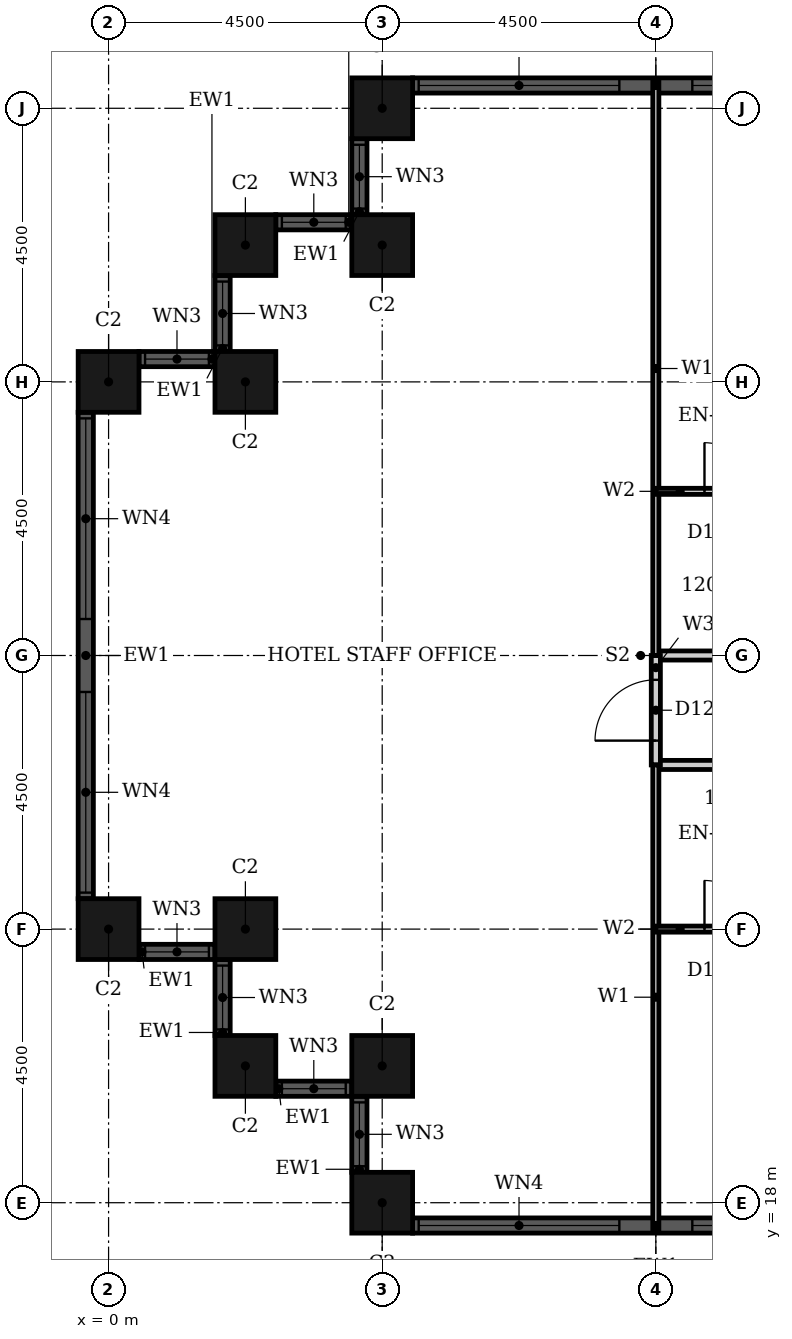
"""IFC4 building model, lengths in metres.
Left out: names, types, materials, properties, quantities, classifications, styles, units other than length and angle.
Written with IfcOpenShell. Run it as: python <this file> out.ifc"""

import sys

from ifc_helpers import new_model, si_unit, direction, frame, frame_2d, origin, origin_2d, place, context, subcontext, project, spatial, rectangle, hollow_rectangle, extrude, element, fill, save


model = new_model("IFC4")
c1 = context("Model", 3, precision=1e-05, world=origin(), true_north=direction((0.0, 1.0)))
c2 = subcontext(c1, "Body", "Model", "MODEL_VIEW")
j1 = project(units=[si_unit("LENGTHUNIT", "METRE"), si_unit("PLANEANGLEUNIT", "RADIAN")], contexts=[c1])
p1 = place(None, origin())
s1 = spatial("IfcSite", under=j1, at=p1, CompositionType="ELEMENT")
p2 = place(p1, origin())
s2 = spatial("IfcBuilding", under=s1, at=p2, CompositionType="ELEMENT")
p3 = place(p2, frame((0.0, 0.0, 56.4)))
s3 = spatial("IfcBuildingStorey", under=s2, at=p3, CompositionType="ELEMENT", Elevation=56.4)
for number, where, z_axis, x_axis in (
    (1, (4.5, 36.0, 0.0), (0.0, 0.0, 1.0), (1.0, 0.0, 0.0)),
    (2, (4.5, 33.75, 0.0), (0.0, 0.0, 1.0), (1.0, 0.0, 0.0)),
    (3, (2.25, 33.75, 0.0), (0.0, 0.0, 1.0), (1.0, 0.0, 0.0)),
    (4, (2.25, 31.5, 0.0), (0.0, 0.0, 1.0), (1.0, 0.0, 0.0)),
    (5, (0.0, 31.5, 0.0), (0.0, 0.0, 1.0), (1.0, 0.0, 0.0)),
    (6, (0.0, 22.5, 0.0), (0.0, 0.0, 1.0), (1.0, 0.0, 0.0)),
    (7, (2.25, 22.5, 0.0), (0.0, 0.0, 1.0), (1.0, 0.0, 0.0)),
    (8, (2.25, 20.25, 0.0), (0.0, 0.0, 1.0), (1.0, 0.0, 0.0)),
    (9, (4.5, 20.25, 0.0), (0.0, 0.0, 1.0), (1.0, 0.0, 0.0)),
    (10, (4.5, 18.0, 0.0), (0.0, 0.0, 1.0), (1.0, 0.0, 0.0)),
):
    element("IfcColumn", number, at=place(p3, frame(where, z_axis=z_axis, x_axis=x_axis)), inside=s3, PredefinedType="COLUMN", context=c2, shape_type="SweptSolid", body=[
        extrude(hollow_rectangle(XDim=1.0, YDim=1.0, WallThickness=0.032, at=origin_2d()), origin(), (0.0, 0.0, 1.0), 3.6),
    ])
p4 = place(p3, frame((13.0, 36.375, 0.0), z_axis=(0.0, 0.0, 1.0), x_axis=(-1.0, 0.0, 0.0)))
e11 = element("IfcWall", 11, at=p4, inside=s3, PredefinedType="SOLIDWALL", context=c2, shape_type="SweptSolid", body=[
    extrude(rectangle(XDim=8.0, YDim=0.25, at=frame_2d((4.0, 0.0))), origin(), (0.0, 0.0, 1.0), 3.6),
])
p5 = place(p4, frame((0.1, 0.0, 0.9)))
e12 = element("IfcOpeningElement", 12, at=p5, cuts=e11, PredefinedType="OPENING", context=c2, shape_type="SweptSolid", body=[
    extrude(rectangle(XDim=3.3, YDim=2.08, at=frame_2d((1.65, 1.04))), frame((0.0, 0.135, 0.0), z_axis=(0.0, -1.0, 0.0), x_axis=(1.0, 0.0, 0.0)), (0.0, 0.0, 1.0), 0.27),
])
p6 = place(p4, frame((4.6, 0.0, 0.9)))
e13 = element("IfcOpeningElement", 13, at=p6, cuts=e11, PredefinedType="OPENING", context=c2, shape_type="SweptSolid", body=[
    extrude(rectangle(XDim=3.3, YDim=2.08, at=frame_2d((1.65, 1.04))), frame((0.0, 0.135, 0.0), z_axis=(0.0, -1.0, 0.0), x_axis=(1.0, 0.0, 0.0)), (0.0, 0.0, 1.0), 0.27),
])
p7 = place(p3, frame((4.125, 35.5, 0.0), z_axis=(0.0, 0.0, 1.0), x_axis=(0.0, -1.0, 0.0)))
e14 = element("IfcWall", 14, at=p7, inside=s3, PredefinedType="SOLIDWALL", context=c2, shape_type="SweptSolid", body=[
    extrude(rectangle(XDim=1.25, YDim=0.25, at=frame_2d((0.625, 0.0))), origin(), (0.0, 0.0, 1.0), 3.6),
])
p8 = place(p7, frame((0.1, 0.0, 0.9)))
e15 = element("IfcOpeningElement", 15, at=p8, cuts=e14, PredefinedType="OPENING", context=c2, shape_type="SweptSolid", body=[
    extrude(rectangle(XDim=1.05, YDim=2.08, at=frame_2d((0.525, 1.04))), frame((0.0, 0.135, 0.0), z_axis=(0.0, -1.0, 0.0), x_axis=(1.0, 0.0, 0.0)), (0.0, 0.0, 1.0), 0.27),
])
p9 = place(p3, frame((4.0, 34.125, 0.0), z_axis=(0.0, 0.0, 1.0), x_axis=(-1.0, 0.0, 0.0)))
e16 = element("IfcWall", 16, at=p9, inside=s3, PredefinedType="SOLIDWALL", context=c2, shape_type="SweptSolid", body=[
    extrude(rectangle(XDim=1.25, YDim=0.25, at=frame_2d((0.625, 0.0))), origin(), (0.0, 0.0, 1.0), 3.6),
])
p10 = place(p9, frame((0.1, 0.0, 0.9)))
e17 = element("IfcOpeningElement", 17, at=p10, cuts=e16, PredefinedType="OPENING", context=c2, shape_type="SweptSolid", body=[
    extrude(rectangle(XDim=1.05, YDim=2.08, at=frame_2d((0.525, 1.04))), frame((0.0, 0.135, 0.0), z_axis=(0.0, -1.0, 0.0), x_axis=(1.0, 0.0, 0.0)), (0.0, 0.0, 1.0), 0.27),
])
p11 = place(p3, frame((1.875, 33.25, 0.0), z_axis=(0.0, 0.0, 1.0), x_axis=(0.0, -1.0, 0.0)))
e18 = element("IfcWall", 18, at=p11, inside=s3, PredefinedType="SOLIDWALL", context=c2, shape_type="SweptSolid", body=[
    extrude(rectangle(XDim=1.25, YDim=0.25, at=frame_2d((0.625, 0.0))), origin(), (0.0, 0.0, 1.0), 3.6),
])
p12 = place(p11, frame((0.1, 0.0, 0.9)))
e19 = element("IfcOpeningElement", 19, at=p12, cuts=e18, PredefinedType="OPENING", context=c2, shape_type="SweptSolid", body=[
    extrude(rectangle(XDim=1.05, YDim=2.08, at=frame_2d((0.525, 1.04))), frame((0.0, 0.135, 0.0), z_axis=(0.0, -1.0, 0.0), x_axis=(1.0, 0.0, 0.0)), (0.0, 0.0, 1.0), 0.27),
])
p13 = place(p3, frame((1.75, 31.875, 0.0), z_axis=(0.0, 0.0, 1.0), x_axis=(-1.0, 0.0, 0.0)))
e20 = element("IfcWall", 20, at=p13, inside=s3, PredefinedType="SOLIDWALL", context=c2, shape_type="SweptSolid", body=[
    extrude(rectangle(XDim=1.25, YDim=0.25, at=frame_2d((0.625, 0.0))), origin(), (0.0, 0.0, 1.0), 3.6),
])
p14 = place(p13, frame((0.1, 0.0, 0.9)))
e21 = element("IfcOpeningElement", 21, at=p14, cuts=e20, PredefinedType="OPENING", context=c2, shape_type="SweptSolid", body=[
    extrude(rectangle(XDim=1.05, YDim=2.08, at=frame_2d((0.525, 1.04))), frame((0.0, 0.135, 0.0), z_axis=(0.0, -1.0, 0.0), x_axis=(1.0, 0.0, 0.0)), (0.0, 0.0, 1.0), 0.27),
])
p15 = place(p3, frame((-0.375, 31.0, 0.0), z_axis=(0.0, 0.0, 1.0), x_axis=(0.0, -1.0, 0.0)))
e22 = element("IfcWall", 22, at=p15, inside=s3, PredefinedType="SOLIDWALL", context=c2, shape_type="SweptSolid", body=[
    extrude(rectangle(XDim=8.0, YDim=0.25, at=frame_2d((4.0, 0.0))), origin(), (0.0, 0.0, 1.0), 3.6),
])
p16 = place(p15, frame((0.1, 0.0, 0.9)))
e23 = element("IfcOpeningElement", 23, at=p16, cuts=e22, PredefinedType="OPENING", context=c2, shape_type="SweptSolid", body=[
    extrude(rectangle(XDim=3.3, YDim=2.08, at=frame_2d((1.65, 1.04))), frame((0.0, 0.135, 0.0), z_axis=(0.0, -1.0, 0.0), x_axis=(1.0, 0.0, 0.0)), (0.0, 0.0, 1.0), 0.27),
])
p17 = place(p15, frame((4.6, 0.0, 0.9)))
e24 = element("IfcOpeningElement", 24, at=p17, cuts=e22, PredefinedType="OPENING", context=c2, shape_type="SweptSolid", body=[
    extrude(rectangle(XDim=3.3, YDim=2.08, at=frame_2d((1.65, 1.04))), frame((0.0, 0.135, 0.0), z_axis=(0.0, -1.0, 0.0), x_axis=(1.0, 0.0, 0.0)), (0.0, 0.0, 1.0), 0.27),
])
p18 = place(p3, frame((0.5, 22.125, 0.0), z_axis=(0.0, 0.0, 1.0), x_axis=(1.0, 0.0, 0.0)))
e25 = element("IfcWall", 25, at=p18, inside=s3, PredefinedType="SOLIDWALL", context=c2, shape_type="SweptSolid", body=[
    extrude(rectangle(XDim=1.25, YDim=0.25, at=frame_2d((0.625, 0.0))), origin(), (0.0, 0.0, 1.0), 3.6),
])
p19 = place(p18, frame((0.1, 0.0, 0.9)))
e26 = element("IfcOpeningElement", 26, at=p19, cuts=e25, PredefinedType="OPENING", context=c2, shape_type="SweptSolid", body=[
    extrude(rectangle(XDim=1.05, YDim=2.08, at=frame_2d((0.525, 1.04))), frame((0.0, 0.135, 0.0), z_axis=(0.0, -1.0, 0.0), x_axis=(1.0, 0.0, 0.0)), (0.0, 0.0, 1.0), 0.27),
])
p20 = place(p3, frame((1.875, 22.0, 0.0), z_axis=(0.0, 0.0, 1.0), x_axis=(0.0, -1.0, 0.0)))
e27 = element("IfcWall", 27, at=p20, inside=s3, PredefinedType="SOLIDWALL", context=c2, shape_type="SweptSolid", body=[
    extrude(rectangle(XDim=1.25, YDim=0.25, at=frame_2d((0.625, 0.0))), origin(), (0.0, 0.0, 1.0), 3.6),
])
p21 = place(p20, frame((0.1, 0.0, 0.9)))
e28 = element("IfcOpeningElement", 28, at=p21, cuts=e27, PredefinedType="OPENING", context=c2, shape_type="SweptSolid", body=[
    extrude(rectangle(XDim=1.05, YDim=2.08, at=frame_2d((0.525, 1.04))), frame((0.0, 0.135, 0.0), z_axis=(0.0, -1.0, 0.0), x_axis=(1.0, 0.0, 0.0)), (0.0, 0.0, 1.0), 0.27),
])
p22 = place(p3, frame((2.75, 19.875, 0.0), z_axis=(0.0, 0.0, 1.0), x_axis=(1.0, 0.0, 0.0)))
e29 = element("IfcWall", 29, at=p22, inside=s3, PredefinedType="SOLIDWALL", context=c2, shape_type="SweptSolid", body=[
    extrude(rectangle(XDim=1.25, YDim=0.25, at=frame_2d((0.625, 0.0))), origin(), (0.0, 0.0, 1.0), 3.6),
])
p23 = place(p22, frame((0.1, 0.0, 0.9)))
e30 = element("IfcOpeningElement", 30, at=p23, cuts=e29, PredefinedType="OPENING", context=c2, shape_type="SweptSolid", body=[
    extrude(rectangle(XDim=1.05, YDim=2.08, at=frame_2d((0.525, 1.04))), frame((0.0, 0.135, 0.0), z_axis=(0.0, -1.0, 0.0), x_axis=(1.0, 0.0, 0.0)), (0.0, 0.0, 1.0), 0.27),
])
p24 = place(p3, frame((4.125, 19.75, 0.0), z_axis=(0.0, 0.0, 1.0), x_axis=(0.0, -1.0, 0.0)))
e31 = element("IfcWall", 31, at=p24, inside=s3, PredefinedType="SOLIDWALL", context=c2, shape_type="SweptSolid", body=[
    extrude(rectangle(XDim=1.25, YDim=0.25, at=frame_2d((0.625, 0.0))), origin(), (0.0, 0.0, 1.0), 3.6),
])
p25 = place(p24, frame((0.1, 0.0, 0.9)))
e32 = element("IfcOpeningElement", 32, at=p25, cuts=e31, PredefinedType="OPENING", context=c2, shape_type="SweptSolid", body=[
    extrude(rectangle(XDim=1.05, YDim=2.08, at=frame_2d((0.525, 1.04))), frame((0.0, 0.135, 0.0), z_axis=(0.0, -1.0, 0.0), x_axis=(1.0, 0.0, 0.0)), (0.0, 0.0, 1.0), 0.27),
])
p26 = place(p3, frame((5.0, 17.625, 0.0), z_axis=(0.0, 0.0, 1.0), x_axis=(1.0, 0.0, 0.0)))
e33 = element("IfcWall", 33, at=p26, inside=s3, PredefinedType="SOLIDWALL", context=c2, shape_type="SweptSolid", body=[
    extrude(rectangle(XDim=8.0, YDim=0.25, at=frame_2d((4.0, 0.0))), origin(), (0.0, 0.0, 1.0), 3.6),
])
p27 = place(p26, frame((0.1, 0.0, 0.9)))
e34 = element("IfcOpeningElement", 34, at=p27, cuts=e33, PredefinedType="OPENING", context=c2, shape_type="SweptSolid", body=[
    extrude(rectangle(XDim=3.3, YDim=2.08, at=frame_2d((1.65, 1.04))), frame((0.0, 0.135, 0.0), z_axis=(0.0, -1.0, 0.0), x_axis=(1.0, 0.0, 0.0)), (0.0, 0.0, 1.0), 0.27),
])
p28 = place(p26, frame((4.6, 0.0, 0.9)))
e35 = element("IfcOpeningElement", 35, at=p28, cuts=e33, PredefinedType="OPENING", context=c2, shape_type="SweptSolid", body=[
    extrude(rectangle(XDim=3.3, YDim=2.08, at=frame_2d((1.65, 1.04))), frame((0.0, 0.135, 0.0), z_axis=(0.0, -1.0, 0.0), x_axis=(1.0, 0.0, 0.0)), (0.0, 0.0, 1.0), 0.27),
])
p29 = place(p3, frame((9.0, 25.2, 0.0), z_axis=(0.0, 0.0, 1.0), x_axis=(1.0, 0.0, 0.0)))
e36 = element("IfcWall", 36, at=p29, inside=s3, PredefinedType="PARTITIONING", context=c2, shape_type="SweptSolid", body=[
    extrude(rectangle(XDim=7.2, YDim=0.15, at=frame_2d((3.6, 0.0))), origin(), (0.0, 0.0, 1.0), 3.3),
])
p30 = place(p29, frame((2.95, 0.0, 0.0)))
e37 = element("IfcOpeningElement", 37, at=p30, cuts=e36, PredefinedType="OPENING", context=c2, shape_type="SweptSolid", body=[
    extrude(rectangle(XDim=1.0, YDim=2.1, at=frame_2d((0.5, 1.05))), frame((0.0, 0.085, 0.0), z_axis=(0.0, -1.0, 0.0), x_axis=(1.0, 0.0, 0.0)), (0.0, 0.0, 1.0), 0.17),
])
p31 = place(p3, frame((9.0, 27.0, 0.0), z_axis=(0.0, 0.0, 1.0), x_axis=(1.0, 0.0, 0.0)))
e38 = element("IfcWall", 38, at=p31, inside=s3, PredefinedType="PARTITIONING", context=c2, shape_type="SweptSolid", body=[
    extrude(rectangle(XDim=7.2, YDim=0.15, at=frame_2d((3.6, 0.0))), origin(), (0.0, 0.0, 1.0), 2.58),
])
p32 = place(p31, frame((2.95, 0.0, 0.0)))
e39 = element("IfcOpeningElement", 39, at=p32, cuts=e38, PredefinedType="OPENING", context=c2, shape_type="SweptSolid", body=[
    extrude(rectangle(XDim=1.0, YDim=2.1, at=frame_2d((0.5, 1.05))), frame((0.0, 0.085, 0.0), z_axis=(0.0, -1.0, 0.0), x_axis=(1.0, 0.0, 0.0)), (0.0, 0.0, 1.0), 0.17),
])
p33 = place(p3, frame((9.0, 25.2, 0.0), z_axis=(0.0, 0.0, 1.0), x_axis=(0.0, 1.0, 0.0)))
e40 = element("IfcWall", 40, at=p33, inside=s3, PredefinedType="PARTITIONING", context=c2, shape_type="SweptSolid", body=[
    extrude(rectangle(XDim=1.8, YDim=0.15, at=frame_2d((0.9, 0.0))), origin(), (0.0, 0.0, 1.0), 3.3),
])
p34 = place(p33, frame((0.4, 0.0, 0.0)))
e41 = element("IfcOpeningElement", 41, at=p34, cuts=e40, PredefinedType="OPENING", context=c2, shape_type="SweptSolid", body=[
    extrude(rectangle(XDim=1.0, YDim=2.1, at=frame_2d((0.5, 1.05))), frame((0.0, 0.085, 0.0), z_axis=(0.0, -1.0, 0.0), x_axis=(1.0, 0.0, 0.0)), (0.0, 0.0, 1.0), 0.17),
])
p35 = place(p3, frame((9.0, 27.0, 0.0), z_axis=(0.0, 0.0, 1.0), x_axis=(0.0, 1.0, 0.0)))
e42 = element("IfcWall", 42, at=p35, inside=s3, PredefinedType="PARTITIONING", context=c2, shape_type="SweptSolid", body=[
    extrude(rectangle(XDim=9.44, YDim=0.1, at=frame_2d((4.72, 0.0))), origin(), (0.0, 0.0, 1.0), 3.3),
])
p36 = place(p3, frame((9.0, 17.56, 0.0), z_axis=(0.0, 0.0, 1.0), x_axis=(0.0, 1.0, 0.0)))
e43 = element("IfcWall", 43, at=p36, inside=s3, PredefinedType="PARTITIONING", context=c2, shape_type="SweptSolid", body=[
    extrude(rectangle(XDim=7.64, YDim=0.1, at=frame_2d((3.82, 0.0))), origin(), (0.0, 0.0, 1.0), 3.3),
])
p37 = place(p3, frame((9.0, 22.5, 0.0), z_axis=(0.0, 0.0, 1.0), x_axis=(1.0, 0.0, 0.0)))
e44 = element("IfcWall", 44, at=p37, inside=s3, PredefinedType="PARTITIONING", context=c2, shape_type="SweptSolid", body=[
    extrude(rectangle(XDim=2.4, YDim=0.1, at=frame_2d((1.2, 0.0))), origin(), (0.0, 0.0, 1.0), 2.58),
])
p38 = place(p37, frame((0.8, 0.0, 0.0)))
e45 = element("IfcOpeningElement", 45, at=p38, cuts=e44, PredefinedType="OPENING", context=c2, shape_type="SweptSolid", body=[
    extrude(rectangle(XDim=0.8, YDim=2.1, at=frame_2d((0.4, 1.05))), frame((0.0, 0.06, 0.0), z_axis=(0.0, -1.0, 0.0), x_axis=(1.0, 0.0, 0.0)), (0.0, 0.0, 1.0), 0.12),
])
p39 = place(p3, frame((9.0, 29.7, 0.0), z_axis=(0.0, 0.0, 1.0), x_axis=(1.0, 0.0, 0.0)))
e46 = element("IfcWall", 46, at=p39, inside=s3, PredefinedType="PARTITIONING", context=c2, shape_type="SweptSolid", body=[
    extrude(rectangle(XDim=2.4, YDim=0.1, at=frame_2d((1.2, 0.0))), origin(), (0.0, 0.0, 1.0), 3.3),
])
p40 = place(p39, frame((0.8, 0.0, 0.0)))
e47 = element("IfcOpeningElement", 47, at=p40, cuts=e46, PredefinedType="OPENING", context=c2, shape_type="SweptSolid", body=[
    extrude(rectangle(XDim=0.8, YDim=2.1, at=frame_2d((0.4, 1.05))), frame((0.0, 0.06, 0.0), z_axis=(0.0, -1.0, 0.0), x_axis=(1.0, 0.0, 0.0)), (0.0, 0.0, 1.0), 0.12),
])
p41 = place(p5, origin())
e48 = element("IfcWindow", 48, at=p41, inside=s3, PartitioningType="SINGLE_PANEL", PredefinedType="WINDOW", context=c2, shape_type="SweptSolid", body=[
    extrude(rectangle(XDim=3.3, YDim=2.08, at=frame_2d((1.65, 1.04))), frame((0.0, 0.03, 0.0), z_axis=(0.0, -1.0, 0.0), x_axis=(1.0, 0.0, 0.0)), (0.0, 0.0, 1.0), 0.06),
])
fill(e12, e48)
p42 = place(p6, origin())
e49 = element("IfcWindow", 49, at=p42, inside=s3, PartitioningType="SINGLE_PANEL", PredefinedType="WINDOW", context=c2, shape_type="SweptSolid", body=[
    extrude(rectangle(XDim=3.3, YDim=2.08, at=frame_2d((1.65, 1.04))), frame((0.0, 0.03, 0.0), z_axis=(0.0, -1.0, 0.0), x_axis=(1.0, 0.0, 0.0)), (0.0, 0.0, 1.0), 0.06),
])
fill(e13, e49)
p43 = place(p8, origin())
e50 = element("IfcWindow", 50, at=p43, inside=s3, PartitioningType="SINGLE_PANEL", PredefinedType="WINDOW", context=c2, shape_type="SweptSolid", body=[
    extrude(rectangle(XDim=1.05, YDim=2.08, at=frame_2d((0.525, 1.04))), frame((0.0, 0.03, 0.0), z_axis=(0.0, -1.0, 0.0), x_axis=(1.0, 0.0, 0.0)), (0.0, 0.0, 1.0), 0.06),
])
fill(e15, e50)
p44 = place(p10, origin())
e51 = element("IfcWindow", 51, at=p44, inside=s3, PartitioningType="SINGLE_PANEL", PredefinedType="WINDOW", context=c2, shape_type="SweptSolid", body=[
    extrude(rectangle(XDim=1.05, YDim=2.08, at=frame_2d((0.525, 1.04))), frame((0.0, 0.03, 0.0), z_axis=(0.0, -1.0, 0.0), x_axis=(1.0, 0.0, 0.0)), (0.0, 0.0, 1.0), 0.06),
])
fill(e17, e51)
p45 = place(p12, origin())
e52 = element("IfcWindow", 52, at=p45, inside=s3, PartitioningType="SINGLE_PANEL", PredefinedType="WINDOW", context=c2, shape_type="SweptSolid", body=[
    extrude(rectangle(XDim=1.05, YDim=2.08, at=frame_2d((0.525, 1.04))), frame((0.0, 0.03, 0.0), z_axis=(0.0, -1.0, 0.0), x_axis=(1.0, 0.0, 0.0)), (0.0, 0.0, 1.0), 0.06),
])
fill(e19, e52)
p46 = place(p14, origin())
e53 = element("IfcWindow", 53, at=p46, inside=s3, PartitioningType="SINGLE_PANEL", PredefinedType="WINDOW", context=c2, shape_type="SweptSolid", body=[
    extrude(rectangle(XDim=1.05, YDim=2.08, at=frame_2d((0.525, 1.04))), frame((0.0, 0.03, 0.0), z_axis=(0.0, -1.0, 0.0), x_axis=(1.0, 0.0, 0.0)), (0.0, 0.0, 1.0), 0.06),
])
fill(e21, e53)
p47 = place(p16, origin())
e54 = element("IfcWindow", 54, at=p47, inside=s3, PartitioningType="SINGLE_PANEL", PredefinedType="WINDOW", context=c2, shape_type="SweptSolid", body=[
    extrude(rectangle(XDim=3.3, YDim=2.08, at=frame_2d((1.65, 1.04))), frame((0.0, 0.03, 0.0), z_axis=(0.0, -1.0, 0.0), x_axis=(1.0, 0.0, 0.0)), (0.0, 0.0, 1.0), 0.06),
])
fill(e23, e54)
p48 = place(p17, origin())
e55 = element("IfcWindow", 55, at=p48, inside=s3, PartitioningType="SINGLE_PANEL", PredefinedType="WINDOW", context=c2, shape_type="SweptSolid", body=[
    extrude(rectangle(XDim=3.3, YDim=2.08, at=frame_2d((1.65, 1.04))), frame((0.0, 0.03, 0.0), z_axis=(0.0, -1.0, 0.0), x_axis=(1.0, 0.0, 0.0)), (0.0, 0.0, 1.0), 0.06),
])
fill(e24, e55)
p49 = place(p19, origin())
e56 = element("IfcWindow", 56, at=p49, inside=s3, PartitioningType="SINGLE_PANEL", PredefinedType="WINDOW", context=c2, shape_type="SweptSolid", body=[
    extrude(rectangle(XDim=1.05, YDim=2.08, at=frame_2d((0.525, 1.04))), frame((0.0, 0.03, 0.0), z_axis=(0.0, -1.0, 0.0), x_axis=(1.0, 0.0, 0.0)), (0.0, 0.0, 1.0), 0.06),
])
fill(e26, e56)
p50 = place(p21, origin())
e57 = element("IfcWindow", 57, at=p50, inside=s3, PartitioningType="SINGLE_PANEL", PredefinedType="WINDOW", context=c2, shape_type="SweptSolid", body=[
    extrude(rectangle(XDim=1.05, YDim=2.08, at=frame_2d((0.525, 1.04))), frame((0.0, 0.03, 0.0), z_axis=(0.0, -1.0, 0.0), x_axis=(1.0, 0.0, 0.0)), (0.0, 0.0, 1.0), 0.06),
])
fill(e28, e57)
p51 = place(p23, origin())
e58 = element("IfcWindow", 58, at=p51, inside=s3, PartitioningType="SINGLE_PANEL", PredefinedType="WINDOW", context=c2, shape_type="SweptSolid", body=[
    extrude(rectangle(XDim=1.05, YDim=2.08, at=frame_2d((0.525, 1.04))), frame((0.0, 0.03, 0.0), z_axis=(0.0, -1.0, 0.0), x_axis=(1.0, 0.0, 0.0)), (0.0, 0.0, 1.0), 0.06),
])
fill(e30, e58)
p52 = place(p25, origin())
e59 = element("IfcWindow", 59, at=p52, inside=s3, PartitioningType="SINGLE_PANEL", PredefinedType="WINDOW", context=c2, shape_type="SweptSolid", body=[
    extrude(rectangle(XDim=1.05, YDim=2.08, at=frame_2d((0.525, 1.04))), frame((0.0, 0.03, 0.0), z_axis=(0.0, -1.0, 0.0), x_axis=(1.0, 0.0, 0.0)), (0.0, 0.0, 1.0), 0.06),
])
fill(e32, e59)
p53 = place(p27, origin())
e60 = element("IfcWindow", 60, at=p53, inside=s3, PartitioningType="SINGLE_PANEL", PredefinedType="WINDOW", context=c2, shape_type="SweptSolid", body=[
    extrude(rectangle(XDim=3.3, YDim=2.08, at=frame_2d((1.65, 1.04))), frame((0.0, 0.03, 0.0), z_axis=(0.0, -1.0, 0.0), x_axis=(1.0, 0.0, 0.0)), (0.0, 0.0, 1.0), 0.06),
])
fill(e34, e60)
p54 = place(p28, origin())
e61 = element("IfcWindow", 61, at=p54, inside=s3, PartitioningType="SINGLE_PANEL", PredefinedType="WINDOW", context=c2, shape_type="SweptSolid", body=[
    extrude(rectangle(XDim=3.3, YDim=2.08, at=frame_2d((1.65, 1.04))), frame((0.0, 0.03, 0.0), z_axis=(0.0, -1.0, 0.0), x_axis=(1.0, 0.0, 0.0)), (0.0, 0.0, 1.0), 0.06),
])
fill(e35, e61)
p55 = place(p38, origin())
e62 = element("IfcDoor", 62, at=p55, inside=s3, OperationType="SINGLE_SWING_RIGHT", PredefinedType="DOOR", context=c2, shape_type="SweptSolid", body=[
    extrude(rectangle(XDim=0.8, YDim=2.1, at=frame_2d((0.4, 1.05))), frame((0.0, 0.025, 0.0), z_axis=(0.0, -1.0, 0.0), x_axis=(1.0, 0.0, 0.0)), (0.0, 0.0, 1.0), 0.05),
])
fill(e45, e62)
p56 = place(p40, origin())
e63 = element("IfcDoor", 63, at=p56, inside=s3, OperationType="SINGLE_SWING_LEFT", PredefinedType="DOOR", context=c2, shape_type="SweptSolid", body=[
    extrude(rectangle(XDim=0.8, YDim=2.1, at=frame_2d((0.4, 1.05))), frame((0.0, 0.025, 0.0), z_axis=(0.0, -1.0, 0.0), x_axis=(1.0, 0.0, 0.0)), (0.0, 0.0, 1.0), 0.05),
])
fill(e47, e63)
p57 = place(p34, origin())
e64 = element("IfcDoor", 64, at=p57, inside=s3, OperationType="SINGLE_SWING_LEFT", PredefinedType="DOOR", context=c2, shape_type="SweptSolid", body=[
    extrude(rectangle(XDim=1.0, YDim=2.1, at=frame_2d((0.5, 1.05))), frame((0.0, 0.025, 0.0), z_axis=(0.0, -1.0, 0.0), x_axis=(1.0, 0.0, 0.0)), (0.0, 0.0, 1.0), 0.05),
])
fill(e41, e64)
save(model, sys.argv[1])
